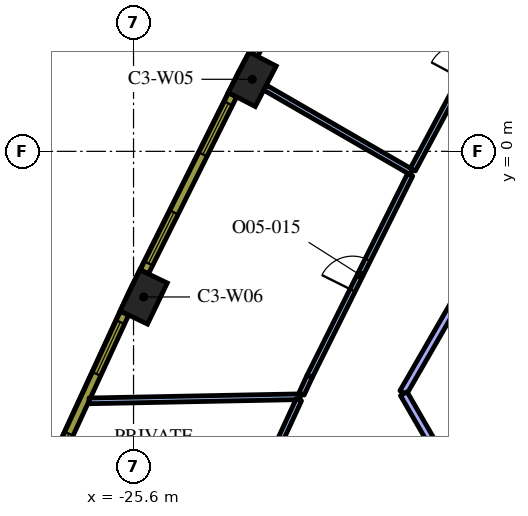
"""IFC4 building model, lengths in metres.
Left out: names, types, materials, properties, quantities, classifications, styles, units other than length and angle.
Written with IfcOpenShell. Run it as: python <this file> out.ifc"""

import sys

from ifc_helpers import new_model, si_unit, direction, frame, frame_2d, origin, origin_2d, place, context, subcontext, project, spatial, rectangle, extrude, element, fill, save


model = new_model("IFC4")
c1 = context("Model", 3, precision=1e-05, world=origin(), true_north=direction((0.0, 1.0)))
c2 = subcontext(c1, "Body", "Model", "MODEL_VIEW")
j1 = project(units=[si_unit("LENGTHUNIT", "METRE"), si_unit("PLANEANGLEUNIT", "RADIAN")], contexts=[c1])
p1 = place(None, origin())
s1 = spatial("IfcSite", under=j1, at=p1, CompositionType="ELEMENT")
p2 = place(p1, origin())
s2 = spatial("IfcBuilding", under=s1, at=p2, CompositionType="ELEMENT")
p3 = place(p2, frame((0.0, 0.0, 192.0)))
s3 = spatial("IfcBuildingStorey", under=s2, at=p3, CompositionType="ELEMENT", Elevation=192.0)
for number, where, z_axis, x_axis in (
    (1, (-22.476, 1.896, 0.0), (0.0, 0.0, 1.0), (-0.46, -0.888, 0.0)),
    (2, (-25.332, -3.832, 0.0), (0.0, 0.0, 1.0), (-0.433, -0.902, 0.0)),
):
    element("IfcColumn", number, at=place(p3, frame(where, z_axis=z_axis, x_axis=x_axis)), inside=s3, PredefinedType="COLUMN", context=c2, shape_type="SweptSolid", body=[
        extrude(rectangle(XDim=1.2, YDim=0.8, at=origin_2d()), origin(), (0.0, 0.0, 1.0), 4.2),
    ])
p4 = place(p3, frame((-18.286, -0.547, 0.0), z_axis=(0.0, 0.0, 1.0), x_axis=(-0.866043033223, 0.499969463673, 0.0)))
e3 = element("IfcWall", 3, at=p4, inside=s3, PredefinedType="PARTITIONING", context=c2, shape_type="SweptSolid", body=[
    extrude(rectangle(XDim=4.449, YDim=0.15, at=frame_2d((2.225, 0.0))), origin(), (0.0, 0.0, 1.0), 3.1),
])
p5 = place(p3, frame((-18.251, -0.481, 0.0), z_axis=(0.0, 0.0, 1.0), x_axis=(0.472318506028, 0.881427948765, 0.0)))
e4 = element("IfcWall", 4, at=p5, inside=s3, PredefinedType="PARTITIONING", context=c2, shape_type="SweptSolid", body=[
    extrude(rectangle(XDim=6.419, YDim=0.15, at=frame_2d((3.21, 0.0))), origin(), (0.0, 0.0, 1.0), 3.1),
])
p6 = place(p5, frame((2.719, 0.0, 0.0)))
e5 = element("IfcOpeningElement", 5, at=p6, cuts=e4, PredefinedType="OPENING", context=c2, shape_type="SweptSolid", body=[
    extrude(rectangle(XDim=0.9, YDim=2.1, at=frame_2d((0.45, 1.05))), frame((0.0, 0.085, 0.0), z_axis=(0.0, -1.0, 0.0), x_axis=(1.0, 0.0, 0.0)), (0.0, 0.0, 1.0), 0.17),
])
p7 = place(p3, frame((-21.213, -6.457, 0.0), z_axis=(0.0, 0.0, 1.0), x_axis=(-0.9998097249, -0.019506767933, 0.0)))
e6 = element("IfcWall", 6, at=p7, inside=s3, PredefinedType="PARTITIONING", context=c2, shape_type="SweptSolid", body=[
    extrude(rectangle(XDim=5.557, YDim=0.15, at=frame_2d((2.778, 0.0))), origin(), (0.0, 0.0, 1.0), 3.1),
])
p8 = place(p3, frame((-20.968, -5.925, 0.0), z_axis=(0.0, 0.0, 1.0), x_axis=(0.446258864447, 0.894903919928, 0.0)))
e7 = element("IfcWall", 7, at=p8, inside=s3, PredefinedType="PARTITIONING", context=c2, shape_type="SweptSolid", body=[
    extrude(rectangle(XDim=5.934, YDim=0.15, at=frame_2d((2.967, 0.0))), origin(), (0.0, 0.0, 1.0), 3.1),
])
p9 = place(p8, frame((2.534, 0.0, 0.0)))
e8 = element("IfcOpeningElement", 8, at=p9, cuts=e7, PredefinedType="OPENING", context=c2, shape_type="SweptSolid", body=[
    extrude(rectangle(XDim=0.9, YDim=2.1, at=frame_2d((0.45, 1.05))), frame((0.0, 0.085, 0.0), z_axis=(0.0, -1.0, 0.0), x_axis=(1.0, 0.0, 0.0)), (0.0, 0.0, 1.0), 0.17),
])
p10 = place(p3, frame((-20.968, -5.925, 0.0), z_axis=(0.0, 0.0, 1.0), x_axis=(-0.418595665074, -0.908172708895, 0.0)))
e9 = element("IfcWall", 9, at=p10, inside=s3, PredefinedType="PARTITIONING", context=c2, shape_type="SweptSolid", body=[
    extrude(rectangle(XDim=0.502, YDim=0.15, at=frame_2d((0.251, 0.0))), origin(), (0.0, 0.0, 1.0), 3.1),
])
p11 = place(p3, frame((-23.362, -11.117, 0.0), z_axis=(0.0, 0.0, 1.0), x_axis=(0.418726921953, 0.908112198372, 0.0)))
e10 = element("IfcWall", 10, at=p11, inside=s3, PredefinedType="PARTITIONING", context=c2, shape_type="SweptSolid", body=[
    extrude(rectangle(XDim=5.048, YDim=0.15, at=frame_2d((2.524, 0.0))), origin(), (0.0, 0.0, 1.0), 3.1),
])
p12 = place(p11, frame((2.048, 0.0, 0.0)))
e11 = element("IfcOpeningElement", 11, at=p12, cuts=e10, PredefinedType="OPENING", context=c2, shape_type="SweptSolid", body=[
    extrude(rectangle(XDim=0.9, YDim=2.1, at=frame_2d((0.45, 1.05))), frame((0.0, 0.085, 0.0), z_axis=(0.0, -1.0, 0.0), x_axis=(1.0, 0.0, 0.0)), (0.0, 0.0, 1.0), 0.17),
])
p13 = place(p3, frame((-14.143, 1.203, 0.0), z_axis=(0.0, 0.0, 1.0), x_axis=(-0.500010806419, -0.866019164606, 0.0)))
e12 = element("IfcWall", 12, at=p13, inside=s3, PredefinedType="PARTITIONING", context=c2, shape_type="SweptSolid", body=[
    extrude(rectangle(XDim=8.721, YDim=0.2, at=frame_2d((4.361, 0.0))), origin(), (0.0, 0.0, 1.0), 3.1),
])
p14 = place(p3, frame((-18.489, -6.376, 0.0), z_axis=(0.0, 0.0, 1.0), x_axis=(0.499954196102, -0.866051847062, 0.0)))
e13 = element("IfcWall", 13, at=p14, inside=s3, PredefinedType="PARTITIONING", context=c2, shape_type="SweptSolid", body=[
    extrude(rectangle(XDim=3.648, YDim=0.2, at=frame_2d((1.824, 0.0))), origin(), (0.0, 0.0, 1.0), 3.1),
])
p15 = place(p3, frame((-19.977, 7.139, 0.0), z_axis=(0.0, 0.0, 1.0), x_axis=(-0.473349833294, -0.880874528704, 0.0)))
e14 = element("IfcWall", 14, at=p15, inside=s3, PredefinedType="SOLIDWALL", context=c2, shape_type="SweptSolid", body=[
    extrude(rectangle(XDim=5.204, YDim=0.24, at=frame_2d((2.602, 0.0))), origin(), (0.0, 0.0, 1.0), 3.9),
])
p16 = place(p15, frame((0.248, 0.0, 0.9)))
e15 = element("IfcOpeningElement", 15, at=p16, cuts=e14, PredefinedType="OPENING", context=c2, shape_type="SweptSolid", body=[
    extrude(rectangle(XDim=1.5, YDim=2.55, at=frame_2d((0.75, 1.275))), frame((0.0, 0.13, 0.0), z_axis=(0.0, -1.0, 0.0), x_axis=(1.0, 0.0, 0.0)), (0.0, 0.0, 1.0), 0.26),
])
p17 = place(p15, frame((3.455, 0.0, 0.9)))
e16 = element("IfcOpeningElement", 16, at=p17, cuts=e14, PredefinedType="OPENING", context=c2, shape_type="SweptSolid", body=[
    extrude(rectangle(XDim=1.5, YDim=2.55, at=frame_2d((0.75, 1.275))), frame((0.0, 0.13, 0.0), z_axis=(0.0, -1.0, 0.0), x_axis=(1.0, 0.0, 0.0)), (0.0, 0.0, 1.0), 0.26),
])
p18 = place(p3, frame((-22.994, 1.485, 0.0), z_axis=(0.0, 0.0, 1.0), x_axis=(-0.446256171312, -0.8949052629, 0.0)))
e17 = element("IfcWall", 17, at=p18, inside=s3, PredefinedType="SOLIDWALL", context=c2, shape_type="SweptSolid", body=[
    extrude(rectangle(XDim=5.203, YDim=0.24, at=frame_2d((2.602, 0.0))), origin(), (0.0, 0.0, 1.0), 3.9),
])
p19 = place(p18, frame((0.248, 0.0, 0.9)))
e18 = element("IfcOpeningElement", 18, at=p19, cuts=e17, PredefinedType="OPENING", context=c2, shape_type="SweptSolid", body=[
    extrude(rectangle(XDim=1.5, YDim=2.55, at=frame_2d((0.75, 1.275))), frame((0.0, 0.13, 0.0), z_axis=(0.0, -1.0, 0.0), x_axis=(1.0, 0.0, 0.0)), (0.0, 0.0, 1.0), 0.26),
])
p20 = place(p18, frame((3.455, 0.0, 0.9)))
e19 = element("IfcOpeningElement", 19, at=p20, cuts=e17, PredefinedType="OPENING", context=c2, shape_type="SweptSolid", body=[
    extrude(rectangle(XDim=1.5, YDim=2.55, at=frame_2d((0.75, 1.275))), frame((0.0, 0.13, 0.0), z_axis=(0.0, -1.0, 0.0), x_axis=(1.0, 0.0, 0.0)), (0.0, 0.0, 1.0), 0.26),
])
p21 = place(p3, frame((-25.837, -4.258, 0.0), z_axis=(0.0, 0.0, 1.0), x_axis=(-0.418722559465, -0.908114209885, 0.0)))
e20 = element("IfcWall", 20, at=p21, inside=s3, PredefinedType="SOLIDWALL", context=c2, shape_type="SweptSolid", body=[
    extrude(rectangle(XDim=5.213, YDim=0.24, at=frame_2d((2.606, 0.0))), origin(), (0.0, 0.0, 1.0), 3.9),
])
p22 = place(p21, frame((0.261, 0.0, 0.9)))
e21 = element("IfcOpeningElement", 21, at=p22, cuts=e20, PredefinedType="OPENING", context=c2, shape_type="SweptSolid", body=[
    extrude(rectangle(XDim=1.5, YDim=2.55, at=frame_2d((0.75, 1.275))), frame((0.0, 0.13, 0.0), z_axis=(0.0, -1.0, 0.0), x_axis=(1.0, 0.0, 0.0)), (0.0, 0.0, 1.0), 0.26),
])
p23 = place(p21, frame((3.492, 0.0, 0.9)))
e22 = element("IfcOpeningElement", 22, at=p23, cuts=e20, PredefinedType="OPENING", context=c2, shape_type="SweptSolid", body=[
    extrude(rectangle(XDim=1.5, YDim=2.55, at=frame_2d((0.75, 1.275))), frame((0.0, 0.13, 0.0), z_axis=(0.0, -1.0, 0.0), x_axis=(1.0, 0.0, 0.0)), (0.0, 0.0, 1.0), 0.26),
])
p24 = place(p9, origin())
e23 = element("IfcDoor", 23, at=p24, inside=s3, OperationType="SINGLE_SWING_RIGHT", PredefinedType="DOOR", context=c2, shape_type="SweptSolid", body=[
    extrude(rectangle(XDim=0.9, YDim=2.1, at=frame_2d((0.45, 1.05))), frame((0.0, 0.025, 0.0), z_axis=(0.0, -1.0, 0.0), x_axis=(1.0, 0.0, 0.0)), (0.0, 0.0, 1.0), 0.05),
])
fill(e8, e23)
p25 = place(p19, origin())
e24 = element("IfcWindow", 24, at=p25, inside=s3, PartitioningType="SINGLE_PANEL", PredefinedType="WINDOW", context=c2, shape_type="SweptSolid", body=[
    extrude(rectangle(XDim=1.5, YDim=2.55, at=frame_2d((0.75, 1.275))), frame((0.0, 0.04, 0.0), z_axis=(0.0, -1.0, 0.0), x_axis=(1.0, 0.0, 0.0)), (0.0, 0.0, 1.0), 0.06),
])
fill(e18, e24)
p26 = place(p20, origin())
e25 = element("IfcWindow", 25, at=p26, inside=s3, PartitioningType="SINGLE_PANEL", PredefinedType="WINDOW", context=c2, shape_type="SweptSolid", body=[
    extrude(rectangle(XDim=1.5, YDim=2.55, at=frame_2d((0.75, 1.275))), frame((0.0, 0.04, 0.0), z_axis=(0.0, -1.0, 0.0), x_axis=(1.0, 0.0, 0.0)), (0.0, 0.0, 1.0), 0.06),
])
fill(e19, e25)
p27 = place(p22, origin())
e26 = element("IfcWindow", 26, at=p27, inside=s3, PartitioningType="SINGLE_PANEL", PredefinedType="WINDOW", context=c2, shape_type="SweptSolid", body=[
    extrude(rectangle(XDim=1.5, YDim=2.55, at=frame_2d((0.75, 1.275))), frame((0.0, 0.04, 0.0), z_axis=(0.0, -1.0, 0.0), x_axis=(1.0, 0.0, 0.0)), (0.0, 0.0, 1.0), 0.06),
])
fill(e21, e26)
p28 = place(p23, origin())
e27 = element("IfcWindow", 27, at=p28, inside=s3, PartitioningType="SINGLE_PANEL", PredefinedType="WINDOW", context=c2, shape_type="SweptSolid", body=[
    extrude(rectangle(XDim=1.5, YDim=2.55, at=frame_2d((0.75, 1.275))), frame((0.0, 0.04, 0.0), z_axis=(0.0, -1.0, 0.0), x_axis=(1.0, 0.0, 0.0)), (0.0, 0.0, 1.0), 0.06),
])
fill(e22, e27)
save(model, sys.argv[1])
